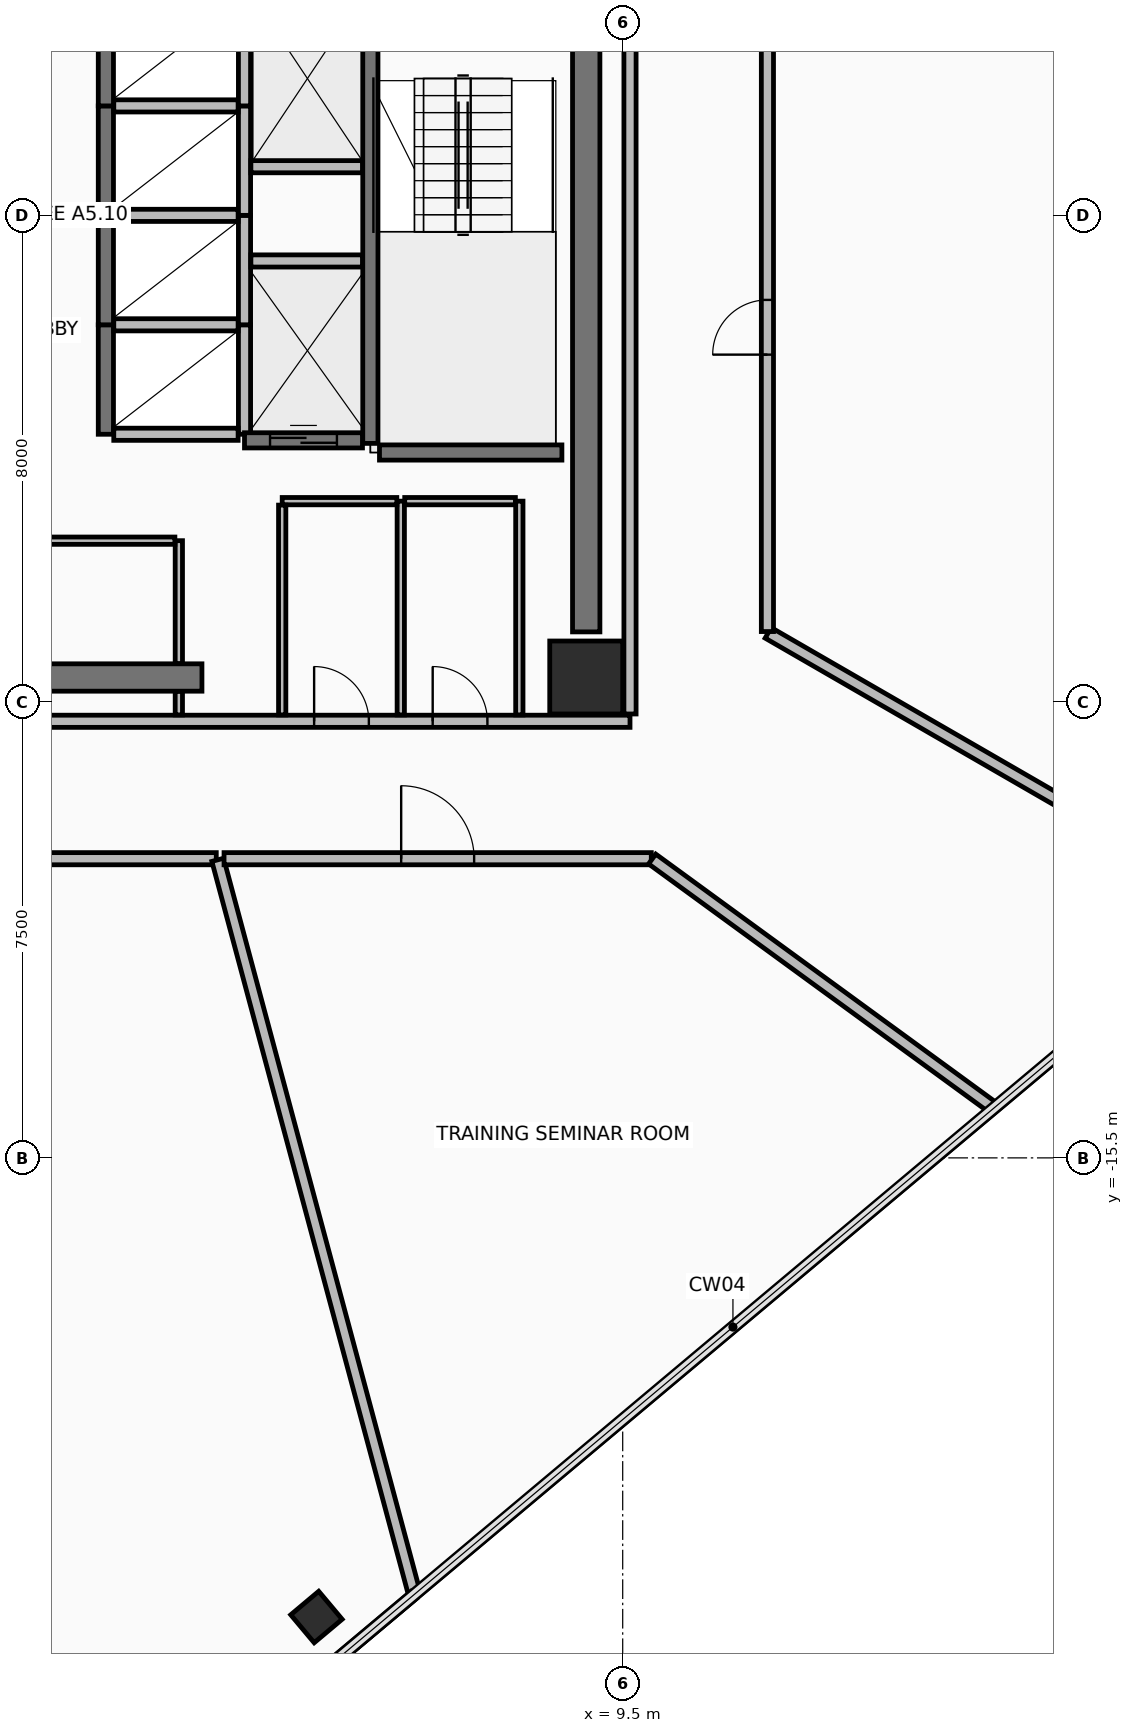
"""IFC4 building model, lengths in metres.
Left out: names, types, materials, properties, quantities, classifications, styles, units other than length and angle.
Written with IfcOpenShell. Run it as: python <this file> out.ifc"""

import sys

from ifc_helpers import new_model, si_unit, direction, frame, frame_2d, origin, origin_2d, place, context, subcontext, project, spatial, rectangle, hollow_rectangle, extrude, element, fill, save


model = new_model("IFC4")
c1 = context("Model", 3, precision=1e-05, world=origin(), true_north=direction((0.0, 1.0)))
c2 = subcontext(c1, "Body", "Model", "MODEL_VIEW")
j1 = project(units=[si_unit("LENGTHUNIT", "METRE"), si_unit("PLANEANGLEUNIT", "RADIAN")], contexts=[c1])
p1 = place(None, origin())
s1 = spatial("IfcSite", under=j1, at=p1, CompositionType="ELEMENT")
p2 = place(p1, origin())
s2 = spatial("IfcBuilding", under=s1, at=p2, CompositionType="ELEMENT")
p3 = place(p2, frame((0.0, 0.0, 177.7)))
s3 = spatial("IfcBuildingStorey", under=s2, at=p3, CompositionType="ELEMENT", Elevation=177.7)
p4 = place(p3, frame((8.9, -7.6, 0.0), z_axis=(0.0, 0.0, 1.0), x_axis=(1.0, 0.0, 0.0)))
e1 = element("IfcColumn", 1, at=p4, inside=s3, PredefinedType="COLUMN", context=c2, shape_type="SweptSolid", body=[
    extrude(rectangle(XDim=1.2, YDim=1.2, at=origin_2d()), origin(), (0.0, 0.0, 1.0), 3.6),
])
p5 = place(p3, frame((4.463, -23.051, 0.0), z_axis=(0.0, 0.0, 1.0), x_axis=(0.766043321242, 0.642788946685, 0.0)))
e2 = element("IfcColumn", 2, at=p5, inside=s3, PredefinedType="COLUMN", context=c2, shape_type="SweptSolid", body=[
    extrude(hollow_rectangle(XDim=0.6, YDim=0.6, WallThickness=0.036, at=origin_2d()), origin(), (0.0, 0.0, 1.0), 3.6),
])
p6 = place(p3, frame((-2.8, -7.6, 0.0), z_axis=(0.0, 0.0, 1.0), x_axis=(1.0, 0.0, 0.0)))
e3 = element("IfcWall", 3, at=p6, inside=s3, PredefinedType="SHEAR", context=c2, shape_type="SweptSolid", body=[
    extrude(rectangle(XDim=5.38, YDim=0.45, at=frame_2d((2.69, 0.0))), origin(), (0.0, 0.0, 1.0), 3.42),
])
p7 = place(p3, frame((8.9, -6.85, 0.0), z_axis=(0.0, 0.0, 1.0), x_axis=(0.0, 1.0, 0.0)))
e4 = element("IfcWall", 4, at=p7, inside=s3, PredefinedType="SHEAR", context=c2, shape_type="SweptSolid", body=[
    extrude(rectangle(XDim=10.7, YDim=0.45, at=frame_2d((5.35, 0.0))), origin(), (0.0, 0.0, 1.0), 3.42),
])
p8 = place(p3, frame((-9.62, -8.32, 0.0), z_axis=(0.0, 0.0, 1.0), x_axis=(1.0, 0.0, 0.0)))
e5 = element("IfcWall", 5, at=p8, inside=s3, PredefinedType="PARTITIONING", context=c2, shape_type="SweptSolid", body=[
    extrude(rectangle(XDim=19.24, YDim=0.2, at=frame_2d((9.62, 0.0))), origin(), (0.0, 0.0, 1.0), 2.865),
])
p9 = place(p8, frame((8.57, 0.0, 0.0)))
e6 = element("IfcOpeningElement", 6, at=p9, cuts=e5, PredefinedType="OPENING", context=c2, shape_type="SweptSolid", body=[
    extrude(rectangle(XDim=0.9, YDim=2.1, at=frame_2d((0.45, 1.05))), frame((0.0, 0.11, 0.0), z_axis=(0.0, -1.0, 0.0), x_axis=(1.0, 0.0, 0.0)), (0.0, 0.0, 1.0), 0.22),
])
p10 = place(p8, frame((14.045, 0.0, 0.0)))
e7 = element("IfcOpeningElement", 7, at=p10, cuts=e5, PredefinedType="OPENING", context=c2, shape_type="SweptSolid", body=[
    extrude(rectangle(XDim=0.9, YDim=2.1, at=frame_2d((0.45, 1.05))), frame((0.0, 0.11, 0.0), z_axis=(0.0, -1.0, 0.0), x_axis=(1.0, 0.0, 0.0)), (0.0, 0.0, 1.0), 0.22),
])
p11 = place(p8, frame((15.995, 0.0, 0.0)))
e8 = element("IfcOpeningElement", 8, at=p11, cuts=e5, PredefinedType="OPENING", context=c2, shape_type="SweptSolid", body=[
    extrude(rectangle(XDim=0.9, YDim=2.1, at=frame_2d((0.45, 1.05))), frame((0.0, 0.11, 0.0), z_axis=(0.0, -1.0, 0.0), x_axis=(1.0, 0.0, 0.0)), (0.0, 0.0, 1.0), 0.22),
])
p12 = place(p3, frame((9.62, -8.2, 0.0), z_axis=(0.0, 0.0, 1.0), x_axis=(0.0, 1.0, 0.0)))
e9 = element("IfcWall", 9, at=p12, inside=s3, PredefinedType="PARTITIONING", context=c2, shape_type="SweptSolid", body=[
    extrude(rectangle(XDim=16.4, YDim=0.2, at=frame_2d((8.2, 0.0))), origin(), (0.0, 0.0, 1.0), 2.865),
])
p13 = place(p12, frame((12.65, 0.0, 0.0)))
e10 = element("IfcOpeningElement", 10, at=p13, cuts=e9, PredefinedType="OPENING", context=c2, shape_type="SweptSolid", body=[
    extrude(rectangle(XDim=1.1, YDim=2.15, at=frame_2d((0.55, 1.075))), frame((0.0, 0.11, 0.0), z_axis=(0.0, -1.0, 0.0), x_axis=(1.0, 0.0, 0.0)), (0.0, 0.0, 1.0), 0.22),
])
p14 = place(p3, frame((5.35, -3.75, 0.0), z_axis=(0.0, 0.0, 1.0), x_axis=(0.0, 1.0, 0.0)))
e11 = element("IfcWall", 11, at=p14, inside=s3, PredefinedType="SHEAR", context=c2, shape_type="SweptSolid", body=[
    extrude(rectangle(XDim=7.3, YDim=0.25, at=frame_2d((3.65, 0.0))), origin(), (0.0, 0.0, 1.0), 3.42),
])
p15 = place(p3, frame((5.5, -3.9, 0.0), z_axis=(0.0, 0.0, 1.0), x_axis=(1.0, 0.0, 0.0)))
e12 = element("IfcWall", 12, at=p15, inside=s3, PredefinedType="SHEAR", context=c2, shape_type="SweptSolid", body=[
    extrude(rectangle(XDim=3.0, YDim=0.25, at=frame_2d((1.5, 0.0))), origin(), (0.0, 0.0, 1.0), 3.42),
])
p16 = place(p3, frame((1.0, -3.6, 0.0), z_axis=(0.0, 0.0, 1.0), x_axis=(0.0, 1.0, 0.0)))
e13 = element("IfcWall", 13, at=p16, inside=s3, PredefinedType="SHEAR", context=c2, shape_type="SweptSolid", body=[
    extrude(rectangle(XDim=1.8, YDim=0.25, at=frame_2d((0.9, 0.0))), origin(), (0.0, 0.0, 1.0), 3.42),
])
p17 = place(p3, frame((3.28, -3.6, 0.0), z_axis=(0.0, 0.0, 1.0), x_axis=(0.0, 1.0, 0.0)))
e14 = element("IfcWall", 14, at=p17, inside=s3, PredefinedType="PARTITIONING", context=c2, shape_type="SweptSolid", body=[
    extrude(rectangle(XDim=1.8, YDim=0.2, at=frame_2d((0.9, 0.0))), origin(), (0.0, 0.0, 1.0), 3.42),
])
for number, where, z_axis, x_axis in (
    (15, (1.13, -3.6, 0.0), (0.0, 0.0, 1.0), (1.0, 0.0, 0.0)),
    (16, (1.13, -1.8, 0.0), (0.0, 0.0, 1.0), (1.0, 0.0, 0.0)),
):
    element("IfcWall", number, at=place(p3, frame(where, z_axis=z_axis, x_axis=x_axis)), inside=s3, PredefinedType="PARTITIONING", context=c2, shape_type="SweptSolid", body=[
        extrude(rectangle(XDim=2.045, YDim=0.2, at=frame_2d((1.022, 0.0))), origin(), (0.0, 0.0, 1.0), 3.42),
    ])
p18 = place(p3, frame((1.0, -1.8, 0.0), z_axis=(0.0, 0.0, 1.0), x_axis=(0.0, 1.0, 0.0)))
e17 = element("IfcWall", 17, at=p18, inside=s3, PredefinedType="SHEAR", context=c2, shape_type="SweptSolid", body=[
    extrude(rectangle(XDim=1.8, YDim=0.25, at=frame_2d((0.9, 0.0))), origin(), (0.0, 0.0, 1.0), 3.42),
])
p19 = place(p3, frame((3.28, -1.8, 0.0), z_axis=(0.0, 0.0, 1.0), x_axis=(0.0, 1.0, 0.0)))
e18 = element("IfcWall", 18, at=p19, inside=s3, PredefinedType="PARTITIONING", context=c2, shape_type="SweptSolid", body=[
    extrude(rectangle(XDim=1.8, YDim=0.2, at=frame_2d((0.9, 0.0))), origin(), (0.0, 0.0, 1.0), 3.42),
])
p20 = place(p3, frame((1.13, 0.0, 0.0), z_axis=(0.0, 0.0, 1.0), x_axis=(1.0, 0.0, 0.0)))
e19 = element("IfcWall", 19, at=p20, inside=s3, PredefinedType="PARTITIONING", context=c2, shape_type="SweptSolid", body=[
    extrude(rectangle(XDim=2.045, YDim=0.2, at=frame_2d((1.022, 0.0))), origin(), (0.0, 0.0, 1.0), 3.42),
])
p21 = place(p3, frame((1.0, 0.0, 0.0), z_axis=(0.0, 0.0, 1.0), x_axis=(0.0, 1.0, 0.0)))
e20 = element("IfcWall", 20, at=p21, inside=s3, PredefinedType="SHEAR", context=c2, shape_type="SweptSolid", body=[
    extrude(rectangle(XDim=1.8, YDim=0.25, at=frame_2d((0.9, 0.0))), origin(), (0.0, 0.0, 1.0), 3.42),
])
p22 = place(p3, frame((3.28, 0.0, 0.0), z_axis=(0.0, 0.0, 1.0), x_axis=(0.0, 1.0, 0.0)))
e21 = element("IfcWall", 21, at=p22, inside=s3, PredefinedType="PARTITIONING", context=c2, shape_type="SweptSolid", body=[
    extrude(rectangle(XDim=1.8, YDim=0.2, at=frame_2d((0.9, 0.0))), origin(), (0.0, 0.0, 1.0), 3.42),
])
p23 = place(p3, frame((1.13, 1.8, 0.0), z_axis=(0.0, 0.0, 1.0), x_axis=(1.0, 0.0, 0.0)))
e22 = element("IfcWall", 22, at=p23, inside=s3, PredefinedType="PARTITIONING", context=c2, shape_type="SweptSolid", body=[
    extrude(rectangle(XDim=2.045, YDim=0.2, at=frame_2d((1.022, 0.0))), origin(), (0.0, 0.0, 1.0), 3.42),
])
p24 = place(p3, frame((1.0, 1.8, 0.0), z_axis=(0.0, 0.0, 1.0), x_axis=(0.0, 1.0, 0.0)))
e23 = element("IfcWall", 23, at=p24, inside=s3, PredefinedType="SHEAR", context=c2, shape_type="SweptSolid", body=[
    extrude(rectangle(XDim=1.8, YDim=0.25, at=frame_2d((0.9, 0.0))), origin(), (0.0, 0.0, 1.0), 3.42),
])
p25 = place(p3, frame((3.28, 1.8, 0.0), z_axis=(0.0, 0.0, 1.0), x_axis=(0.0, 1.0, 0.0)))
e24 = element("IfcWall", 24, at=p25, inside=s3, PredefinedType="PARTITIONING", context=c2, shape_type="SweptSolid", body=[
    extrude(rectangle(XDim=1.8, YDim=0.2, at=frame_2d((0.9, 0.0))), origin(), (0.0, 0.0, 1.0), 3.42),
])
p26 = place(p3, frame((3.385, 0.8, 0.0), z_axis=(0.0, 0.0, 1.0), x_axis=(1.0, 0.0, 0.0)))
e25 = element("IfcWall", 25, at=p26, inside=s3, PredefinedType="PARTITIONING", context=c2, shape_type="SweptSolid", body=[
    extrude(rectangle(XDim=1.835, YDim=0.2, at=frame_2d((0.917, 0.0))), origin(), (0.0, 0.0, 1.0), 3.42),
])
p27 = place(p3, frame((3.28, -3.7, 0.0), z_axis=(0.0, 0.0, 1.0), x_axis=(1.0, 0.0, 0.0)))
e26 = element("IfcWall", 26, at=p27, inside=s3, PredefinedType="SHEAR", context=c2, shape_type="SweptSolid", body=[
    extrude(rectangle(XDim=1.94, YDim=0.25, at=frame_2d((0.97, 0.0))), origin(), (0.0, 0.0, 1.0), 3.42),
])
p28 = place(p27, frame((0.42, 0.0, 0.0)))
e27 = element("IfcOpeningElement", 27, at=p28, cuts=e26, PredefinedType="OPENING", context=c2, shape_type="SweptSolid", body=[
    extrude(rectangle(XDim=1.1, YDim=2.2, at=frame_2d((0.55, 1.1))), frame((0.0, 0.135, 0.0), z_axis=(0.0, -1.0, 0.0), x_axis=(1.0, 0.0, 0.0)), (0.0, 0.0, 1.0), 0.27),
])
p29 = place(p3, frame((3.385, -0.75, 0.0), z_axis=(0.0, 0.0, 1.0), x_axis=(1.0, 0.0, 0.0)))
e28 = element("IfcWall", 28, at=p29, inside=s3, PredefinedType="PARTITIONING", context=c2, shape_type="SweptSolid", body=[
    extrude(rectangle(XDim=1.835, YDim=0.2, at=frame_2d((0.917, 0.0))), origin(), (0.0, 0.0, 1.0), 3.42),
])
p30 = place(p3, frame((2.2, -8.215, 0.0), z_axis=(0.0, 0.0, 1.0), x_axis=(0.0, 1.0, 0.0)))
e29 = element("IfcWall", 29, at=p30, inside=s3, PredefinedType="PARTITIONING", context=c2, shape_type="SweptSolid", body=[
    extrude(rectangle(XDim=0.385, YDim=0.12, at=frame_2d((0.192, 0.0))), origin(), (0.0, 0.0, 1.0), 2.715),
])
p31 = place(p3, frame((2.2, -7.37, 0.0), z_axis=(0.0, 0.0, 1.0), x_axis=(0.0, 1.0, 0.0)))
e30 = element("IfcWall", 30, at=p31, inside=s3, PredefinedType="PARTITIONING", context=c2, shape_type="SweptSolid", body=[
    extrude(rectangle(XDim=2.02, YDim=0.12, at=frame_2d((1.01, 0.0))), origin(), (0.0, 0.0, 1.0), 2.715),
])
p32 = place(p3, frame((2.135, -5.35, 0.0), z_axis=(0.0, 0.0, 1.0), x_axis=(-1.0, 0.0, 0.0)))
e31 = element("IfcWall", 31, at=p32, inside=s3, PredefinedType="PARTITIONING", context=c2, shape_type="SweptSolid", body=[
    extrude(rectangle(XDim=5.535, YDim=0.12, at=frame_2d((2.768, 0.0))), origin(), (0.0, 0.0, 1.0), 2.715),
])
p33 = place(p3, frame((5.85, -8.215, 0.0), z_axis=(0.0, 0.0, 1.0), x_axis=(0.0, 1.0, 0.0)))
e32 = element("IfcWall", 32, at=p33, inside=s3, PredefinedType="PARTITIONING", context=c2, shape_type="SweptSolid", body=[
    extrude(rectangle(XDim=3.515, YDim=0.12, at=frame_2d((1.758, 0.0))), origin(), (0.0, 0.0, 1.0), 2.715),
])
p34 = place(p3, frame((5.785, -4.7, 0.0), z_axis=(0.0, 0.0, 1.0), x_axis=(-1.0, 0.0, 0.0)))
e33 = element("IfcWall", 33, at=p34, inside=s3, PredefinedType="PARTITIONING", context=c2, shape_type="SweptSolid", body=[
    extrude(rectangle(XDim=1.885, YDim=0.12, at=frame_2d((0.942, 0.0))), origin(), (0.0, 0.0, 1.0), 3.42),
])
p35 = place(p3, frame((3.9, -4.765, 0.0), z_axis=(0.0, 0.0, 1.0), x_axis=(0.0, -1.0, 0.0)))
e34 = element("IfcWall", 34, at=p35, inside=s3, PredefinedType="PARTITIONING", context=c2, shape_type="SweptSolid", body=[
    extrude(rectangle(XDim=3.45, YDim=0.12, at=frame_2d((1.725, 0.0))), origin(), (0.0, 0.0, 1.0), 2.715),
])
p36 = place(p3, frame((7.8, -8.215, 0.0), z_axis=(0.0, 0.0, 1.0), x_axis=(0.0, 1.0, 0.0)))
e35 = element("IfcWall", 35, at=p36, inside=s3, PredefinedType="PARTITIONING", context=c2, shape_type="SweptSolid", body=[
    extrude(rectangle(XDim=3.515, YDim=0.12, at=frame_2d((1.758, 0.0))), origin(), (0.0, 0.0, 1.0), 2.715),
])
p37 = place(p3, frame((7.735, -4.7, 0.0), z_axis=(0.0, 0.0, 1.0), x_axis=(-1.0, 0.0, 0.0)))
e36 = element("IfcWall", 36, at=p37, inside=s3, PredefinedType="PARTITIONING", context=c2, shape_type="SweptSolid", body=[
    extrude(rectangle(XDim=1.82, YDim=0.12, at=frame_2d((0.91, 0.0))), origin(), (0.0, 0.0, 1.0), 3.42),
])
p38 = place(p3, frame((-6.094, -10.58, 0.0), z_axis=(0.0, 0.0, 1.0), x_axis=(1.0, 0.0, 0.0)))
e37 = element("IfcWall", 37, at=p38, inside=s3, PredefinedType="PARTITIONING", context=c2, shape_type="SweptSolid", body=[
    extrude(rectangle(XDim=8.91, YDim=0.2, at=frame_2d((4.455, 0.0))), origin(), (0.0, 0.0, 1.0), 3.42),
])
p39 = place(p38, frame((4.03, 0.0, 0.0)))
e38 = element("IfcOpeningElement", 38, at=p39, cuts=e37, PredefinedType="OPENING", context=c2, shape_type="SweptSolid", body=[
    extrude(rectangle(XDim=0.85, YDim=2.1, at=frame_2d((0.425, 1.05))), frame((0.0, 0.11, 0.0), z_axis=(0.0, -1.0, 0.0), x_axis=(1.0, 0.0, 0.0)), (0.0, 0.0, 1.0), 0.22),
])
p40 = place(p3, frame((2.84, -10.598, 0.0), z_axis=(0.0, 0.0, 1.0), x_axis=(0.258817191025, -0.965926323086, 0.0)))
e39 = element("IfcWall", 39, at=p40, inside=s3, PredefinedType="PARTITIONING", context=c2, shape_type="SweptSolid", body=[
    extrude(rectangle(XDim=12.488, YDim=0.2, at=frame_2d((6.244, 0.0))), origin(), (0.0, 0.0, 1.0), 2.715),
])
p41 = place(p3, frame((6.064, -22.687, 0.0), z_axis=(0.0, 0.0, 1.0), x_axis=(-0.766045343091, -0.64278653714, 0.0)))
e40 = element("IfcWall", 40, at=p41, inside=s3, PredefinedType="PARTITIONING", context=c2, shape_type="SweptSolid", body=[
    extrude(rectangle(XDim=19.205, YDim=0.15, at=frame_2d((9.603, 0.0))), origin(), (0.0, 0.0, 1.0), 3.42),
])
p42 = place(p3, frame((2.944, -10.58, 0.0), z_axis=(0.0, 0.0, 1.0), x_axis=(1.0, 0.0, 0.0)))
e41 = element("IfcWall", 41, at=p42, inside=s3, PredefinedType="PARTITIONING", context=c2, shape_type="SweptSolid", body=[
    extrude(rectangle(XDim=7.026, YDim=0.2, at=frame_2d((3.513, 0.0))), origin(), (0.0, 0.0, 1.0), 2.865),
])
p43 = place(p42, frame((2.913, 0.0, 0.0)))
e42 = element("IfcOpeningElement", 42, at=p43, cuts=e41, PredefinedType="OPENING", context=c2, shape_type="SweptSolid", body=[
    extrude(rectangle(XDim=1.2, YDim=2.15, at=frame_2d((0.6, 1.075))), frame((0.0, 0.11, 0.0), z_axis=(0.0, -1.0, 0.0), x_axis=(1.0, 0.0, 0.0)), (0.0, 0.0, 1.0), 0.22),
])
p44 = place(p3, frame((9.985, -10.585, 0.0), z_axis=(0.0, 0.0, 1.0), x_axis=(0.807846973011, -0.589392287189, 0.0)))
e43 = element("IfcWall", 43, at=p44, inside=s3, PredefinedType="PARTITIONING", context=c2, shape_type="SweptSolid", body=[
    extrude(rectangle(XDim=6.954, YDim=0.2, at=frame_2d((3.477, 0.0))), origin(), (0.0, 0.0, 1.0), 2.715),
])
p45 = place(p3, frame((19.594, -11.312, 0.0), z_axis=(0.0, 0.0, 1.0), x_axis=(-0.866024653538, 0.500001299462, 0.0)))
e44 = element("IfcWall", 44, at=p45, inside=s3, PredefinedType="PARTITIONING", context=c2, shape_type="SweptSolid", body=[
    extrude(rectangle(XDim=8.893, YDim=0.2, at=frame_2d((4.446, 0.0))), origin(), (0.0, 0.0, 1.0), 2.715),
])
p46 = place(p3, frame((11.88, -6.844, 0.0), z_axis=(0.0, 0.0, 1.0), x_axis=(0.0, 1.0, 0.0)))
e45 = element("IfcWall", 45, at=p46, inside=s3, PredefinedType="PARTITIONING", context=c2, shape_type="SweptSolid", body=[
    extrude(rectangle(XDim=10.009, YDim=0.2, at=frame_2d((5.004, 0.0))), origin(), (0.0, 0.0, 1.0), 2.865),
])
p47 = place(p46, frame((4.554, 0.0, 0.0)))
e46 = element("IfcOpeningElement", 46, at=p47, cuts=e45, PredefinedType="OPENING", context=c2, shape_type="SweptSolid", body=[
    extrude(rectangle(XDim=0.9, YDim=2.1, at=frame_2d((0.45, 1.05))), frame((0.0, 0.11, 0.0), z_axis=(0.0, -1.0, 0.0), x_axis=(1.0, 0.0, 0.0)), (0.0, 0.0, 1.0), 0.22),
])
p48 = place(p28, origin())
e47 = element("IfcDoor", 47, at=p48, inside=s3, OperationType="SLIDING_TO_LEFT", PredefinedType="DOOR", context=c2, shape_type="SweptSolid", body=[
    extrude(rectangle(XDim=1.1, YDim=2.2, at=frame_2d((0.55, 1.1))), frame((0.0, 0.025, 0.0), z_axis=(0.0, -1.0, 0.0), x_axis=(1.0, 0.0, 0.0)), (0.0, 0.0, 1.0), 0.05),
])
fill(e27, e47)
p49 = place(p10, origin())
e48 = element("IfcDoor", 48, at=p49, inside=s3, OperationType="SINGLE_SWING_LEFT", PredefinedType="DOOR", context=c2, shape_type="SweptSolid", body=[
    extrude(rectangle(XDim=0.9, YDim=2.1, at=frame_2d((0.45, 1.05))), frame((0.0, 0.025, 0.0), z_axis=(0.0, -1.0, 0.0), x_axis=(1.0, 0.0, 0.0)), (0.0, 0.0, 1.0), 0.05),
])
fill(e7, e48)
p50 = place(p11, origin())
e49 = element("IfcDoor", 49, at=p50, inside=s3, OperationType="SINGLE_SWING_LEFT", PredefinedType="DOOR", context=c2, shape_type="SweptSolid", body=[
    extrude(rectangle(XDim=0.9, YDim=2.1, at=frame_2d((0.45, 1.05))), frame((0.0, 0.025, 0.0), z_axis=(0.0, -1.0, 0.0), x_axis=(1.0, 0.0, 0.0)), (0.0, 0.0, 1.0), 0.05),
])
fill(e8, e49)
p51 = place(p43, origin())
e50 = element("IfcDoor", 50, at=p51, inside=s3, OperationType="SINGLE_SWING_LEFT", PredefinedType="DOOR", context=c2, shape_type="SweptSolid", body=[
    extrude(rectangle(XDim=1.2, YDim=2.15, at=frame_2d((0.6, 1.075))), frame((0.0, 0.025, 0.0), z_axis=(0.0, -1.0, 0.0), x_axis=(1.0, 0.0, 0.0)), (0.0, 0.0, 1.0), 0.05),
])
fill(e42, e50)
p52 = place(p47, origin())
e51 = element("IfcDoor", 51, at=p52, inside=s3, OperationType="SINGLE_SWING_LEFT", PredefinedType="DOOR", context=c2, shape_type="SweptSolid", body=[
    extrude(rectangle(XDim=0.9, YDim=2.1, at=frame_2d((0.45, 1.05))), frame((0.0, 0.025, 0.0), z_axis=(0.0, -1.0, 0.0), x_axis=(1.0, 0.0, 0.0)), (0.0, 0.0, 1.0), 0.05),
])
fill(e46, e51)
save(model, sys.argv[1])
